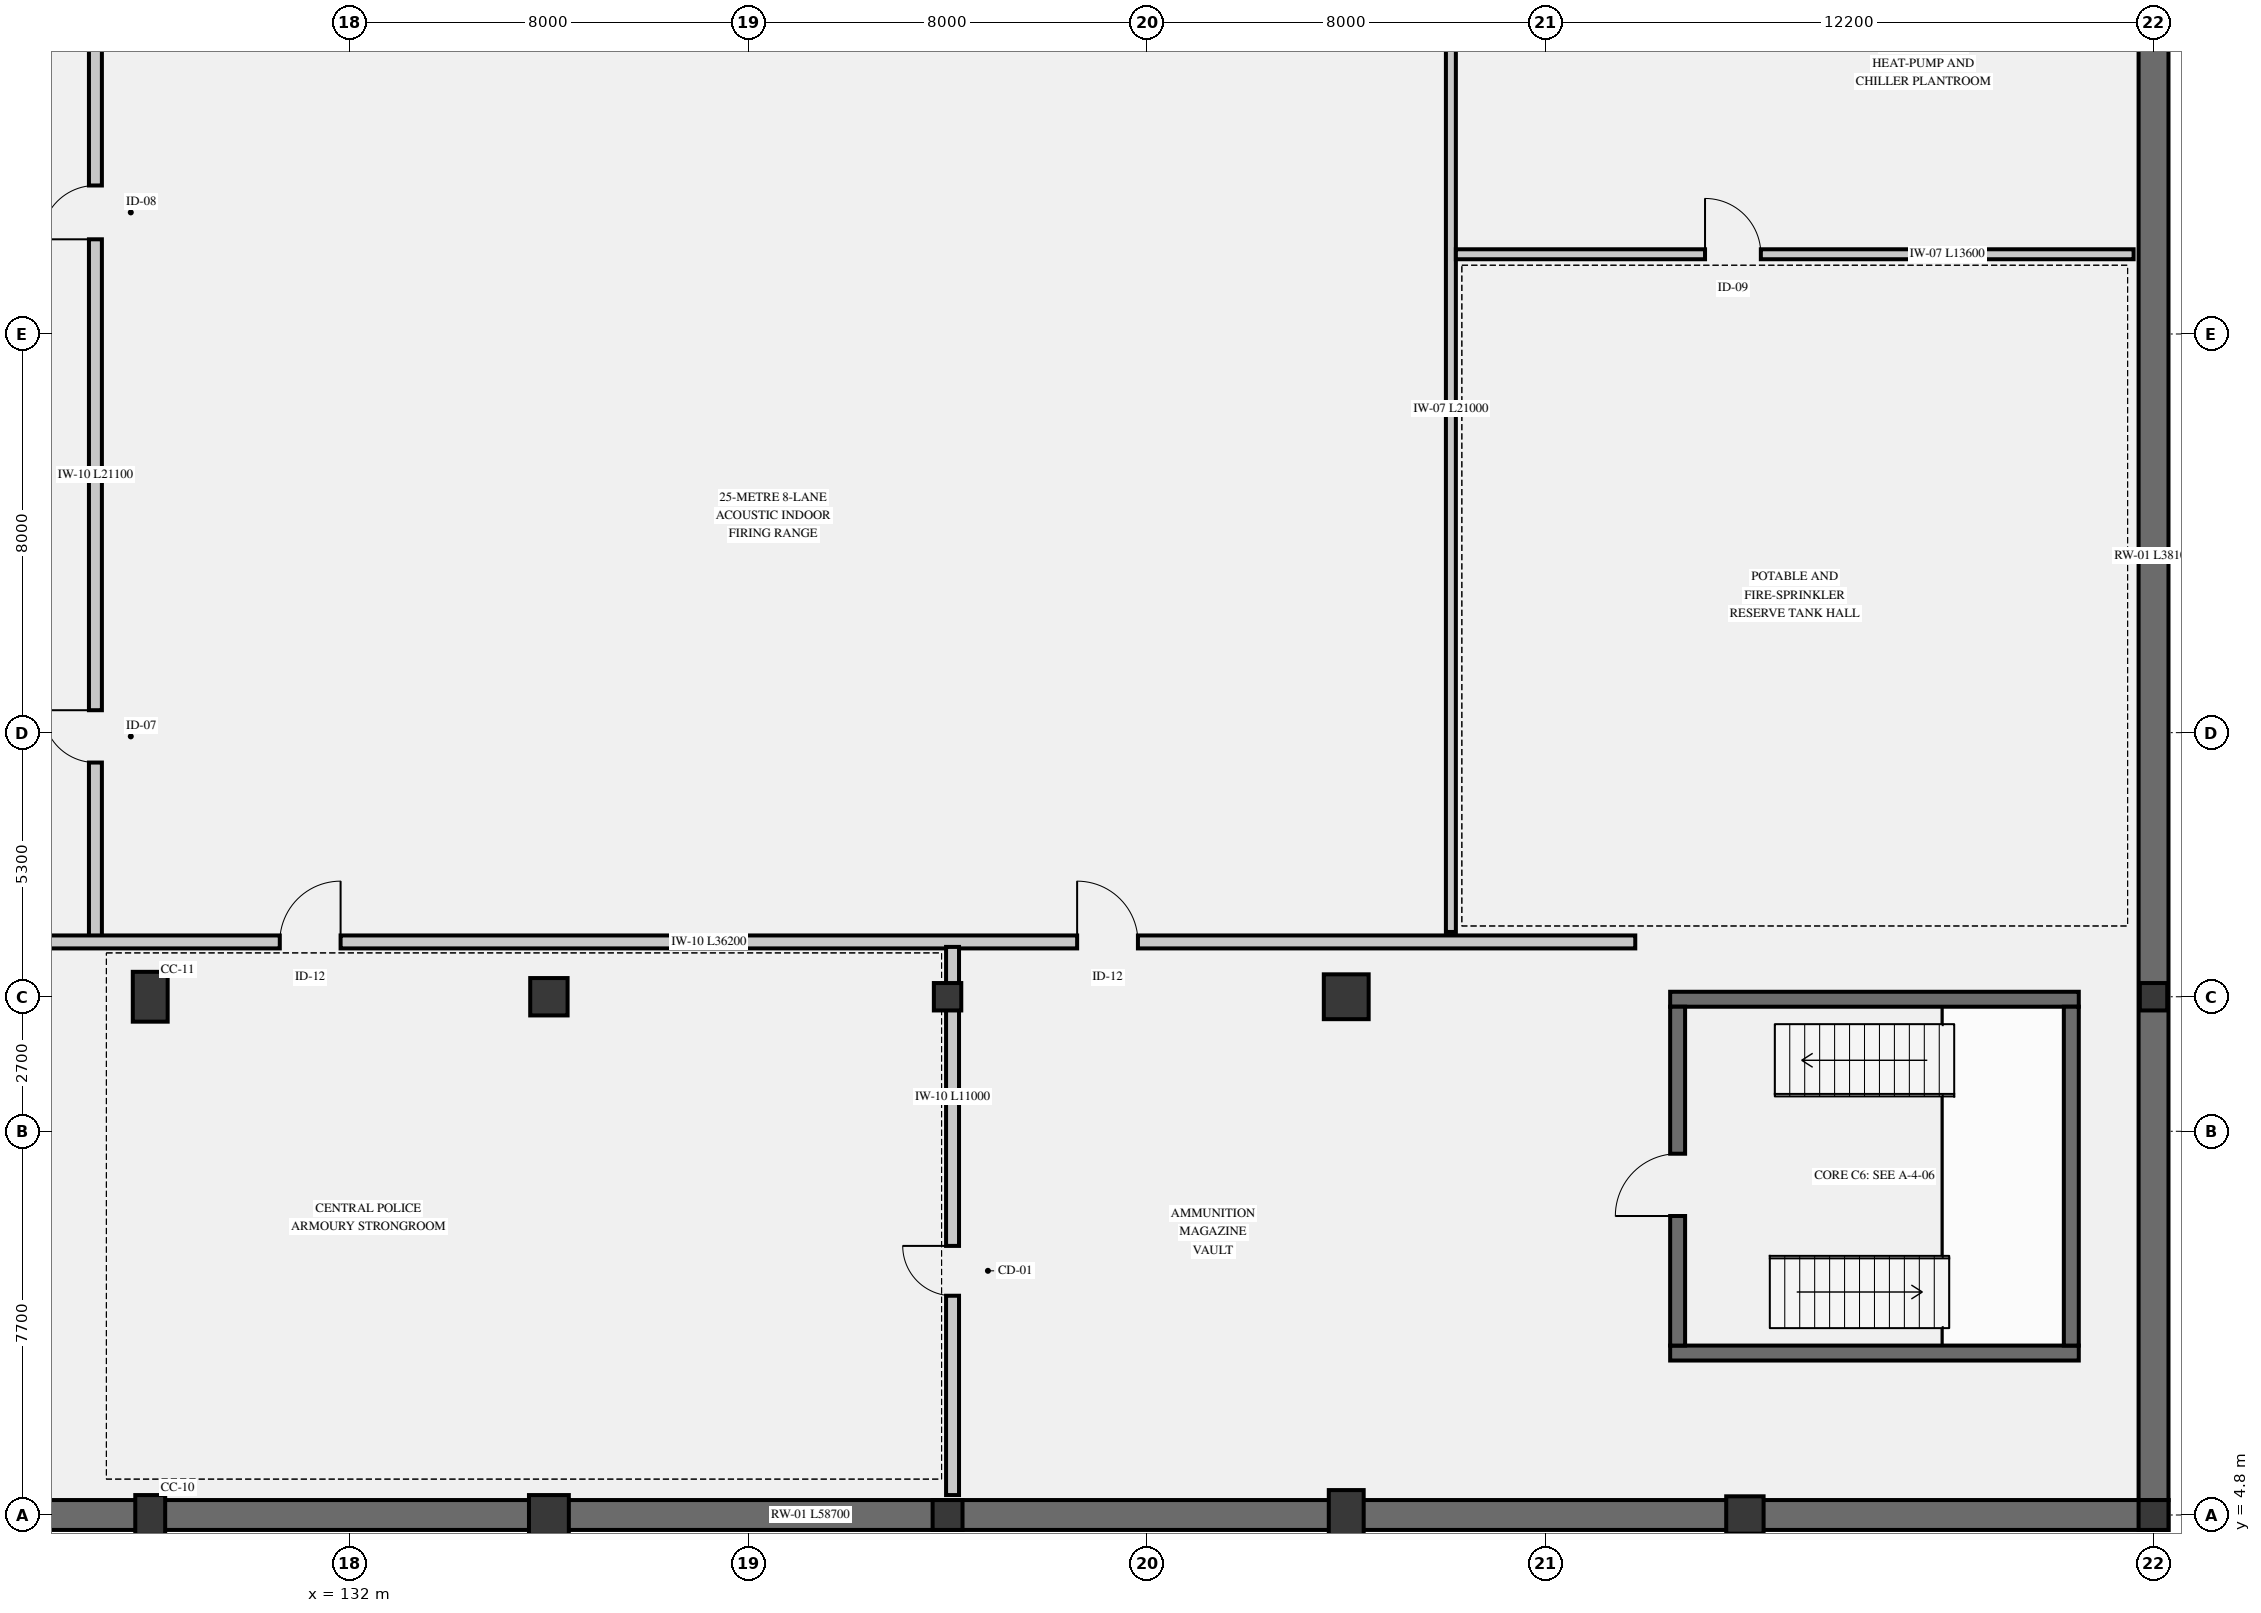
"""IFC4 building model, lengths in metres.
Left out: names, types, materials, properties, quantities, classifications, styles, units other than length and angle.
Written with IfcOpenShell. Run it as: python <this file> out.ifc"""

import sys

from ifc_helpers import new_model, si_unit, direction, frame, frame_2d, origin, origin_2d, place, context, subcontext, project, spatial, rectangle, extrude, element, fill, save


model = new_model("IFC4")
c1 = context("Model", 3, precision=1e-05, world=origin(), true_north=direction((0.0, 1.0)))
c2 = subcontext(c1, "Body", "Model", "MODEL_VIEW")
j1 = project(units=[si_unit("LENGTHUNIT", "METRE"), si_unit("PLANEANGLEUNIT", "RADIAN")], contexts=[c1])
p1 = place(None, origin())
s1 = spatial("IfcSite", under=j1, at=p1, CompositionType="ELEMENT")
p2 = place(p1, origin())
s2 = spatial("IfcBuilding", under=s1, at=p2, CompositionType="ELEMENT")
p3 = place(p2, frame((0.0, 0.0, -8.4)))
s3 = spatial("IfcBuildingStorey", under=s2, at=p3, CompositionType="ELEMENT", Elevation=-8.4)
p4 = place(p3, frame((109.8, 4.8, 0.0), z_axis=(0.0, 0.0, 1.0), x_axis=(1.0, 0.0, 0.0)))
e1 = element("IfcWall", 1, at=p4, inside=s3, PredefinedType="USERDEFINED", context=c2, shape_type="SweptSolid", body=[
    extrude(rectangle(XDim=58.7, YDim=0.6, at=frame_2d((29.35, 0.0))), origin(), (0.0, 0.0, 1.0), 3.92),
])
p5 = place(p3, frame((168.2, 5.1, 0.0), z_axis=(0.0, 0.0, 1.0), x_axis=(0.0, 1.0, 0.0)))
e2 = element("IfcWall", 2, at=p5, inside=s3, PredefinedType="USERDEFINED", context=c2, shape_type="SweptSolid", body=[
    extrude(rectangle(XDim=38.1, YDim=0.6, at=frame_2d((19.05, 0.0))), origin(), (0.0, 0.0, 1.0), 3.92),
])
for number, where, z_axis, x_axis in (
    (3, (158.5, 8.05, 0.0), (0.0, 0.0, 1.0), (1.0, 0.0, 0.0)),
    (4, (158.5, 15.15, 0.0), (0.0, 0.0, 1.0), (1.0, 0.0, 0.0)),
):
    element("IfcWall", number, at=place(p3, frame(where, z_axis=z_axis, x_axis=x_axis)), inside=s3, PredefinedType="SHEAR", context=c2, shape_type="SweptSolid", body=[
        extrude(rectangle(XDim=8.2, YDim=0.3, at=frame_2d((4.1, 0.0))), origin(), (0.0, 0.0, 1.0), 3.92),
    ])
p6 = place(p3, frame((158.65, 8.2, 0.0), z_axis=(0.0, 0.0, 1.0), x_axis=(0.0, 1.0, 0.0)))
e5 = element("IfcWall", 5, at=p6, inside=s3, PredefinedType="SHEAR", context=c2, shape_type="SweptSolid", body=[
    extrude(rectangle(XDim=6.8, YDim=0.3, at=frame_2d((3.4, 0.0))), origin(), (0.0, 0.0, 1.0), 3.92),
])
p7 = place(p6, frame((2.6, 0.0, 0.0)))
e6 = element("IfcOpeningElement", 6, at=p7, cuts=e5, PredefinedType="OPENING", context=c2, shape_type="SweptSolid", body=[
    extrude(rectangle(XDim=1.25, YDim=2.2, at=frame_2d((0.625, 1.1))), frame((0.0, 0.16, 0.0), z_axis=(0.0, -1.0, 0.0), x_axis=(1.0, 0.0, 0.0)), (0.0, 0.0, 1.0), 0.32),
])
p8 = place(p3, frame((166.55, 8.2, 0.0), z_axis=(0.0, 0.0, 1.0), x_axis=(0.0, 1.0, 0.0)))
e7 = element("IfcWall", 7, at=p8, inside=s3, PredefinedType="SHEAR", context=c2, shape_type="SweptSolid", body=[
    extrude(rectangle(XDim=6.8, YDim=0.3, at=frame_2d((3.4, 0.0))), origin(), (0.0, 0.0, 1.0), 3.92),
])
p9 = place(p3, frame((128.0, 4.8, -0.44), z_axis=(0.0, 0.0, 1.0), x_axis=(1.0, 0.0, 0.0)))
e8 = element("IfcColumn", 8, at=p9, inside=s3, PredefinedType="COLUMN", context=c2, shape_type="SweptSolid", body=[
    extrude(rectangle(XDim=0.6, YDim=0.8, at=origin_2d()), origin(), (0.0, 0.0, 1.0), 4.64),
])
p10 = place(p3, frame((128.0, 15.2, -0.44), z_axis=(0.0, 0.0, 1.0), x_axis=(1.0, 0.0, 0.0)))
e9 = element("IfcColumn", 9, at=p10, inside=s3, PredefinedType="COLUMN", context=c2, shape_type="SweptSolid", body=[
    extrude(rectangle(XDim=0.7, YDim=1.0, at=origin_2d()), origin(), (0.0, 0.0, 1.0), 4.64),
])
p11 = place(p3, frame((136.0, 4.8, -0.44), z_axis=(0.0, 0.0, 1.0), x_axis=(1.0, 0.0, 0.0)))
e10 = element("IfcColumn", 10, at=p11, inside=s3, PredefinedType="COLUMN", context=c2, shape_type="SweptSolid", body=[
    extrude(rectangle(XDim=0.8, YDim=0.8, at=origin_2d()), origin(), (0.0, 0.0, 1.0), 4.64),
])
p12 = place(p3, frame((136.0, 15.2, -0.44), z_axis=(0.0, 0.0, 1.0), x_axis=(1.0, 0.0, 0.0)))
e11 = element("IfcColumn", 11, at=p12, inside=s3, PredefinedType="COLUMN", context=c2, shape_type="SweptSolid", body=[
    extrude(rectangle(XDim=0.75, YDim=0.75, at=origin_2d()), origin(), (0.0, 0.0, 1.0), 4.64),
])
p13 = place(p3, frame((144.0, 4.8, -0.44), z_axis=(0.0, 0.0, 1.0), x_axis=(1.0, 0.0, 0.0)))
e12 = element("IfcColumn", 12, at=p13, inside=s3, PredefinedType="COLUMN", context=c2, shape_type="SweptSolid", body=[
    extrude(rectangle(XDim=0.6, YDim=0.6, at=origin_2d()), origin(), (0.0, 0.0, 1.0), 4.64),
])
p14 = place(p3, frame((144.0, 15.2, -0.44), z_axis=(0.0, 0.0, 1.0), x_axis=(1.0, 0.0, 0.0)))
e13 = element("IfcColumn", 13, at=p14, inside=s3, PredefinedType="COLUMN", context=c2, shape_type="SweptSolid", body=[
    extrude(rectangle(XDim=0.55, YDim=0.55, at=origin_2d()), origin(), (0.0, 0.0, 1.0), 4.64),
])
p15 = place(p3, frame((152.0, 4.8, -0.44), z_axis=(0.0, 0.0, 1.0), x_axis=(1.0, 0.0, 0.0)))
e14 = element("IfcColumn", 14, at=p15, inside=s3, PredefinedType="COLUMN", context=c2, shape_type="SweptSolid", body=[
    extrude(rectangle(XDim=0.7, YDim=1.0, at=origin_2d()), origin(), (0.0, 0.0, 1.0), 4.64),
])
p16 = place(p3, frame((152.0, 15.2, -0.44), z_axis=(0.0, 0.0, 1.0), x_axis=(1.0, 0.0, 0.0)))
e15 = element("IfcColumn", 15, at=p16, inside=s3, PredefinedType="COLUMN", context=c2, shape_type="SweptSolid", body=[
    extrude(rectangle(XDim=0.9, YDim=0.9, at=origin_2d()), origin(), (0.0, 0.0, 1.0), 4.64),
])
p17 = place(p3, frame((160.0, 4.8, -0.44), z_axis=(0.0, 0.0, 1.0), x_axis=(1.0, 0.0, 0.0)))
e16 = element("IfcColumn", 16, at=p17, inside=s3, PredefinedType="COLUMN", context=c2, shape_type="SweptSolid", body=[
    extrude(rectangle(XDim=0.75, YDim=0.75, at=origin_2d()), origin(), (0.0, 0.0, 1.0), 4.64),
])
p18 = place(p3, frame((168.2, 4.8, -0.44), z_axis=(0.0, 0.0, 1.0), x_axis=(1.0, 0.0, 0.0)))
e17 = element("IfcColumn", 17, at=p18, inside=s3, PredefinedType="COLUMN", context=c2, shape_type="SweptSolid", body=[
    extrude(rectangle(XDim=0.6, YDim=0.6, at=origin_2d()), origin(), (0.0, 0.0, 1.0), 4.64),
])
p19 = place(p3, frame((168.2, 15.2, -0.44), z_axis=(0.0, 0.0, 1.0), x_axis=(1.0, 0.0, 0.0)))
e18 = element("IfcColumn", 18, at=p19, inside=s3, PredefinedType="COLUMN", context=c2, shape_type="SweptSolid", body=[
    extrude(rectangle(XDim=0.55, YDim=0.55, at=origin_2d()), origin(), (0.0, 0.0, 1.0), 4.64),
])
p20 = place(p3, frame((126.9, 16.4, 0.0), z_axis=(0.0, 0.0, 1.0), x_axis=(0.0, 1.0, 0.0)))
e19 = element("IfcWall", 19, at=p20, inside=s3, PredefinedType="PARTITIONING", context=c2, shape_type="SweptSolid", body=[
    extrude(rectangle(XDim=21.1, YDim=0.26, at=frame_2d((10.55, 0.0))), origin(), (0.0, 0.0, 1.0), 3.208),
])
p21 = place(p20, frame((3.5, 0.0, 0.0)))
e20 = element("IfcOpeningElement", 20, at=p21, cuts=e19, PredefinedType="OPENING", context=c2, shape_type="SweptSolid", body=[
    extrude(rectangle(XDim=1.05, YDim=2.2, at=frame_2d((0.525, 1.1))), frame((0.0, 0.14, 0.0), z_axis=(0.0, -1.0, 0.0), x_axis=(1.0, 0.0, 0.0)), (0.0, 0.0, 1.0), 0.28),
])
p22 = place(p20, frame((14.0, 0.0, 0.0)))
e21 = element("IfcOpeningElement", 21, at=p22, cuts=e19, PredefinedType="OPENING", context=c2, shape_type="SweptSolid", body=[
    extrude(rectangle(XDim=1.08, YDim=2.22, at=frame_2d((0.54, 1.11))), frame((0.0, 0.14, 0.0), z_axis=(0.0, -1.0, 0.0), x_axis=(1.0, 0.0, 0.0)), (0.0, 0.0, 1.0), 0.28),
])
p23 = place(p3, frame((121.6, 16.3, 0.0), z_axis=(0.0, 0.0, 1.0), x_axis=(1.0, 0.0, 0.0)))
e22 = element("IfcWall", 22, at=p23, inside=s3, PredefinedType="PARTITIONING", context=c2, shape_type="SweptSolid", body=[
    extrude(rectangle(XDim=36.2, YDim=0.26, at=frame_2d((18.1, 0.0))), origin(), (0.0, 0.0, 1.0), 3.108),
])
p24 = place(p23, frame((9.0, 0.0, 0.0)))
e23 = element("IfcOpeningElement", 23, at=p24, cuts=e22, PredefinedType="OPENING", context=c2, shape_type="SweptSolid", body=[
    extrude(rectangle(XDim=1.22, YDim=2.25, at=frame_2d((0.61, 1.125))), frame((0.0, 0.14, 0.0), z_axis=(0.0, -1.0, 0.0), x_axis=(1.0, 0.0, 0.0)), (0.0, 0.0, 1.0), 0.28),
])
p25 = place(p23, frame((25.0, 0.0, 0.0)))
e24 = element("IfcOpeningElement", 24, at=p25, cuts=e22, PredefinedType="OPENING", context=c2, shape_type="SweptSolid", body=[
    extrude(rectangle(XDim=1.22, YDim=2.25, at=frame_2d((0.61, 1.125))), frame((0.0, 0.14, 0.0), z_axis=(0.0, -1.0, 0.0), x_axis=(1.0, 0.0, 0.0)), (0.0, 0.0, 1.0), 0.28),
])
p26 = place(p3, frame((144.1, 5.2, 0.0), z_axis=(0.0, 0.0, 1.0), x_axis=(0.0, 1.0, 0.0)))
e25 = element("IfcWall", 25, at=p26, inside=s3, PredefinedType="PARTITIONING", context=c2, shape_type="SweptSolid", body=[
    extrude(rectangle(XDim=11.0, YDim=0.26, at=frame_2d((5.5, 0.0))), origin(), (0.0, 0.0, 1.0), 3.11),
])
p27 = place(p26, frame((4.0, 0.0, 0.0)))
e26 = element("IfcOpeningElement", 26, at=p27, cuts=e25, PredefinedType="OPENING", context=c2, shape_type="SweptSolid", body=[
    extrude(rectangle(XDim=1.0, YDim=2.15, at=frame_2d((0.5, 1.075))), frame((0.0, 0.14, 0.0), z_axis=(0.0, -1.0, 0.0), x_axis=(1.0, 0.0, 0.0)), (0.0, 0.0, 1.0), 0.28),
])
p28 = place(p3, frame((154.1, 16.5, 0.0), z_axis=(0.0, 0.0, 1.0), x_axis=(0.0, 1.0, 0.0)))
e27 = element("IfcWall", 27, at=p28, inside=s3, PredefinedType="PARTITIONING", context=c2, shape_type="SweptSolid", body=[
    extrude(rectangle(XDim=21.0, YDim=0.2, at=frame_2d((10.5, 0.0))), origin(), (0.0, 0.0, 1.0), 3.208),
])
p29 = place(p3, frame((154.2, 30.1, 0.0), z_axis=(0.0, 0.0, 1.0), x_axis=(1.0, 0.0, 0.0)))
e28 = element("IfcWall", 28, at=p29, inside=s3, PredefinedType="PARTITIONING", context=c2, shape_type="SweptSolid", body=[
    extrude(rectangle(XDim=13.6, YDim=0.2, at=frame_2d((6.8, 0.0))), origin(), (0.0, 0.0, 1.0), 3.108),
])
p30 = place(p29, frame((5.0, 0.0, 0.0)))
e29 = element("IfcOpeningElement", 29, at=p30, cuts=e28, PredefinedType="OPENING", context=c2, shape_type="SweptSolid", body=[
    extrude(rectangle(XDim=1.12, YDim=2.2, at=frame_2d((0.56, 1.1))), frame((0.0, 0.11, 0.0), z_axis=(0.0, -1.0, 0.0), x_axis=(1.0, 0.0, 0.0)), (0.0, 0.0, 1.0), 0.22),
])
p31 = place(p7, origin())
e30 = element("IfcDoor", 30, at=p31, inside=s3, OperationType="SINGLE_SWING_LEFT", PredefinedType="DOOR", context=c2, shape_type="SweptSolid", body=[
    extrude(rectangle(XDim=1.25, YDim=2.2, at=frame_2d((0.625, 1.1))), frame((0.0, 0.025, 0.0), z_axis=(0.0, -1.0, 0.0), x_axis=(1.0, 0.0, 0.0)), (0.0, 0.0, 1.0), 0.05),
])
fill(e6, e30)
p32 = place(p21, origin())
e31 = element("IfcDoor", 31, at=p32, inside=s3, OperationType="SINGLE_SWING_RIGHT", PredefinedType="DOOR", context=c2, shape_type="SweptSolid", body=[
    extrude(rectangle(XDim=1.05, YDim=2.2, at=frame_2d((0.525, 1.1))), frame((0.0, 0.025, 0.0), z_axis=(0.0, -1.0, 0.0), x_axis=(1.0, 0.0, 0.0)), (0.0, 0.0, 1.0), 0.05),
])
fill(e20, e31)
p33 = place(p22, origin())
e32 = element("IfcDoor", 32, at=p33, inside=s3, OperationType="SINGLE_SWING_LEFT", PredefinedType="DOOR", context=c2, shape_type="SweptSolid", body=[
    extrude(rectangle(XDim=1.08, YDim=2.22, at=frame_2d((0.54, 1.11))), frame((0.0, 0.025, 0.0), z_axis=(0.0, -1.0, 0.0), x_axis=(1.0, 0.0, 0.0)), (0.0, 0.0, 1.0), 0.05),
])
fill(e21, e32)
p34 = place(p24, origin())
e33 = element("IfcDoor", 33, at=p34, inside=s3, OperationType="SINGLE_SWING_RIGHT", PredefinedType="DOOR", context=c2, shape_type="SweptSolid", body=[
    extrude(rectangle(XDim=1.22, YDim=2.25, at=frame_2d((0.61, 1.125))), frame((0.0, 0.025, 0.0), z_axis=(0.0, -1.0, 0.0), x_axis=(1.0, 0.0, 0.0)), (0.0, 0.0, 1.0), 0.05),
])
fill(e23, e33)
p35 = place(p25, origin())
e34 = element("IfcDoor", 34, at=p35, inside=s3, OperationType="SINGLE_SWING_LEFT", PredefinedType="DOOR", context=c2, shape_type="SweptSolid", body=[
    extrude(rectangle(XDim=1.22, YDim=2.25, at=frame_2d((0.61, 1.125))), frame((0.0, 0.025, 0.0), z_axis=(0.0, -1.0, 0.0), x_axis=(1.0, 0.0, 0.0)), (0.0, 0.0, 1.0), 0.05),
])
fill(e24, e34)
p36 = place(p27, origin())
e35 = element("IfcDoor", 35, at=p36, inside=s3, OperationType="SINGLE_SWING_RIGHT", PredefinedType="DOOR", context=c2, shape_type="SweptSolid", body=[
    extrude(rectangle(XDim=1.0, YDim=2.15, at=frame_2d((0.5, 1.075))), frame((0.0, 0.025, 0.0), z_axis=(0.0, -1.0, 0.0), x_axis=(1.0, 0.0, 0.0)), (0.0, 0.0, 1.0), 0.05),
])
fill(e26, e35)
p37 = place(p30, origin())
e36 = element("IfcDoor", 36, at=p37, inside=s3, OperationType="SINGLE_SWING_LEFT", PredefinedType="DOOR", context=c2, shape_type="SweptSolid", body=[
    extrude(rectangle(XDim=1.12, YDim=2.2, at=frame_2d((0.56, 1.1))), frame((0.0, 0.025, 0.0), z_axis=(0.0, -1.0, 0.0), x_axis=(1.0, 0.0, 0.0)), (0.0, 0.0, 1.0), 0.05),
])
fill(e29, e36)
save(model, sys.argv[1])
